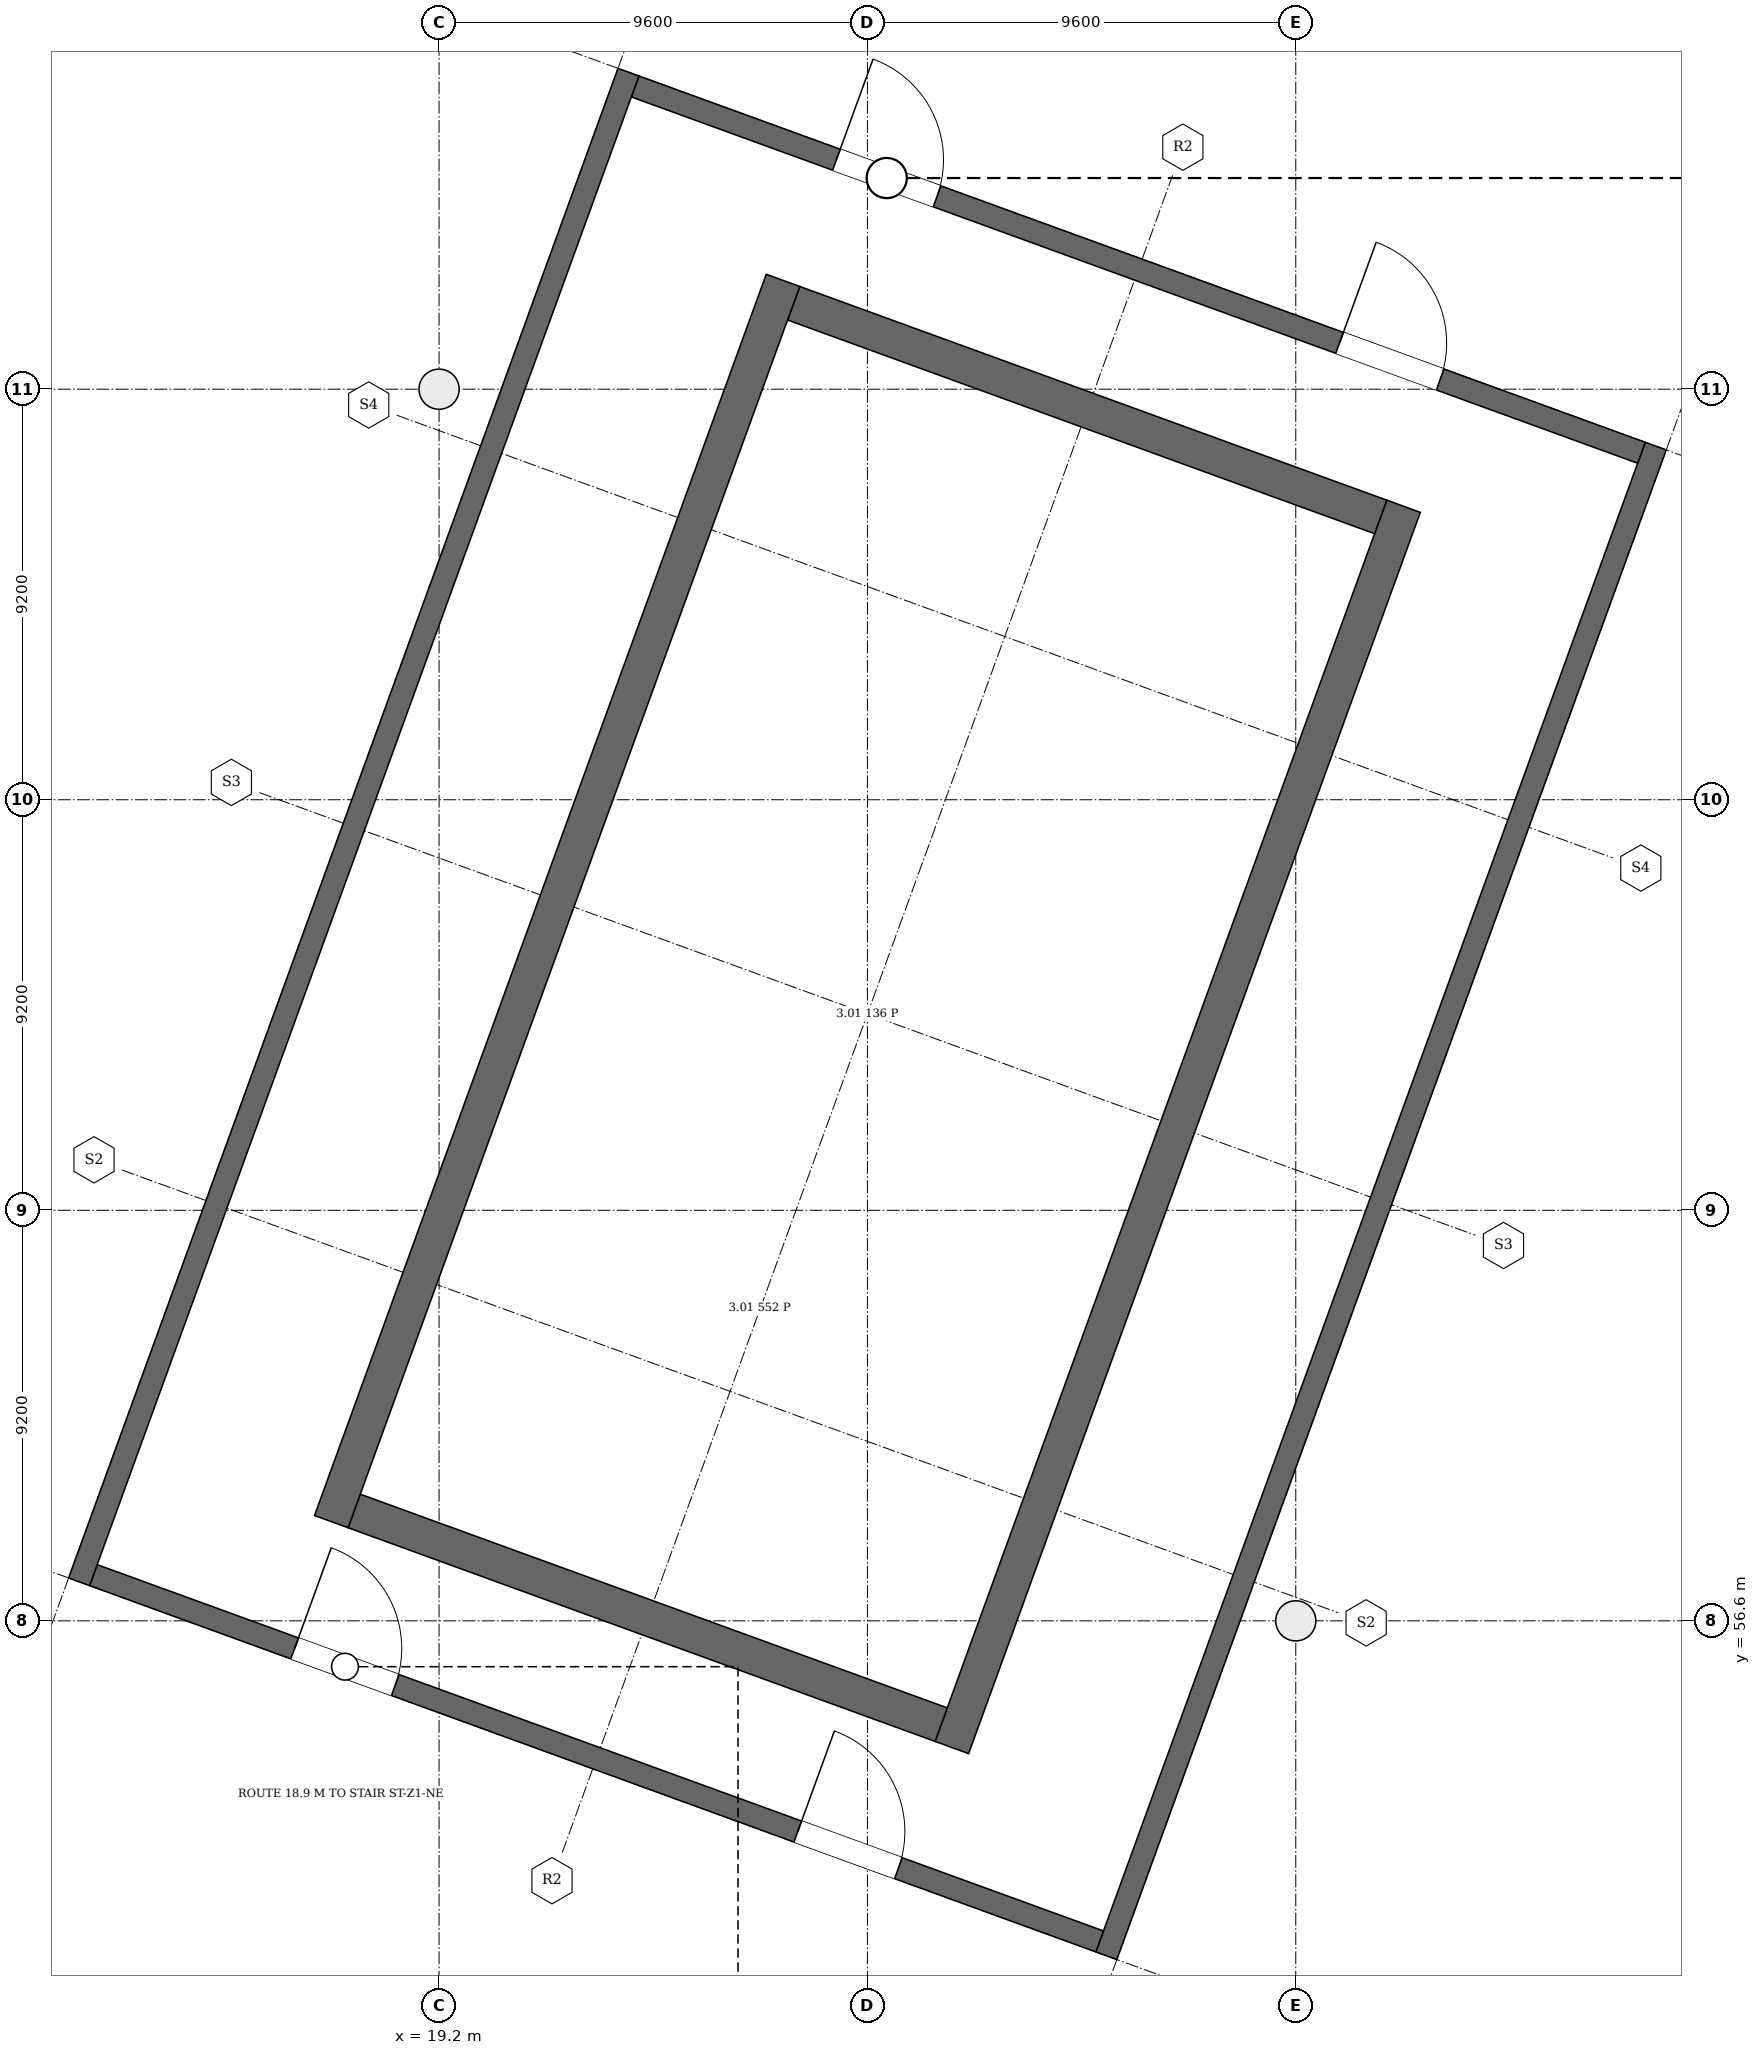
"""IFC4 building model, lengths in metres.
Left out: names, types, materials, properties, quantities, classifications, styles, units other than length and angle.
Written with IfcOpenShell. Run it as: python <this file> out.ifc"""

import sys

from ifc_helpers import new_model, si_unit, direction, frame, frame_2d, origin, origin_2d, place, context, subcontext, project, spatial, rectangle, circle, extrude, element, fill, save


model = new_model("IFC4")
c1 = context("Model", 3, precision=1e-05, world=origin(), true_north=direction((0.0, 1.0)))
c2 = subcontext(c1, "Body", "Model", "MODEL_VIEW")
j1 = project(units=[si_unit("LENGTHUNIT", "METRE"), si_unit("PLANEANGLEUNIT", "RADIAN")], contexts=[c1])
p1 = place(None, origin())
s1 = spatial("IfcSite", under=j1, at=p1, CompositionType="ELEMENT")
p2 = place(p1, origin())
s2 = spatial("IfcBuilding", under=s1, at=p2, CompositionType="ELEMENT")
p3 = place(p2, frame((0.0, 0.0, 21.7)))
s3 = spatial("IfcBuildingStorey", under=s2, at=p3, CompositionType="ELEMENT", Elevation=21.7)
p4 = place(p3, frame((11.132, 57.475, 0.0), z_axis=(0.0, 0.0, 1.0), x_axis=(0.342021295667, 0.939692201367, 0.0)))
e1 = element("IfcWall", 1, at=p4, inside=s3, PredefinedType="SHEAR", context=c2, shape_type="SweptSolid", body=[
    extrude(rectangle(XDim=36.0, YDim=0.5, at=frame_2d((18.0, 0.0))), origin(), (0.0, 0.0, 1.0), 5.0),
])
p5 = place(p3, frame((34.155, 49.096, 0.0), z_axis=(0.0, 0.0, 1.0), x_axis=(0.342019116079, 0.939692994673, 0.0)))
e2 = element("IfcWall", 2, at=p5, inside=s3, PredefinedType="SHEAR", context=c2, shape_type="SweptSolid", body=[
    extrude(rectangle(XDim=36.0, YDim=0.5, at=frame_2d((18.0, 0.0))), origin(), (0.0, 0.0, 1.0), 5.0),
])
p6 = place(p3, frame((11.453, 57.625, 0.0), z_axis=(0.0, 0.0, 1.0), x_axis=(0.939691804709, -0.342022385471, 0.0)))
e3 = element("IfcWall", 3, at=p6, inside=s3, PredefinedType="SHEAR", context=c2, shape_type="SweptSolid", body=[
    extrude(rectangle(XDim=24.0, YDim=0.5, at=frame_2d((12.0, 0.0))), origin(), (0.0, 0.0, 1.0), 5.0),
])
p7 = place(p6, frame((4.8, 0.0, 0.0)))
e4 = element("IfcOpeningElement", 4, at=p7, cuts=e3, PredefinedType="OPENING", context=c2, shape_type="SweptSolid", body=[
    extrude(rectangle(XDim=2.4, YDim=2.4, at=frame_2d((1.2, 1.2))), frame((0.0, 0.26, 0.0), z_axis=(0.0, -1.0, 0.0), x_axis=(1.0, 0.0, 0.0)), (0.0, 0.0, 1.0), 0.52),
])
p8 = place(p6, frame((16.8, 0.0, 0.0)))
e5 = element("IfcOpeningElement", 5, at=p8, cuts=e3, PredefinedType="OPENING", context=c2, shape_type="SweptSolid", body=[
    extrude(rectangle(XDim=2.4, YDim=2.4, at=frame_2d((1.2, 1.2))), frame((0.0, 0.26, 0.0), z_axis=(0.0, -1.0, 0.0), x_axis=(1.0, 0.0, 0.0)), (0.0, 0.0, 1.0), 0.52),
])
p9 = place(p3, frame((23.594, 90.984, 0.0), z_axis=(0.0, 0.0, 1.0), x_axis=(0.939692994673, -0.342019116079, 0.0)))
e6 = element("IfcWall", 6, at=p9, inside=s3, PredefinedType="SHEAR", context=c2, shape_type="SweptSolid", body=[
    extrude(rectangle(XDim=24.0, YDim=0.5, at=frame_2d((12.0, 0.0))), origin(), (0.0, 0.0, 1.0), 5.0),
])
p10 = place(p9, frame((4.8, 0.0, 0.0)))
e7 = element("IfcOpeningElement", 7, at=p10, cuts=e6, PredefinedType="OPENING", context=c2, shape_type="SweptSolid", body=[
    extrude(rectangle(XDim=2.4, YDim=2.4, at=frame_2d((1.2, 1.2))), frame((0.0, 0.26, 0.0), z_axis=(0.0, -1.0, 0.0), x_axis=(1.0, 0.0, 0.0)), (0.0, 0.0, 1.0), 0.52),
])
p11 = place(p9, frame((16.8, 0.0, 0.0)))
e8 = element("IfcOpeningElement", 8, at=p11, cuts=e6, PredefinedType="OPENING", context=c2, shape_type="SweptSolid", body=[
    extrude(rectangle(XDim=2.4, YDim=2.4, at=frame_2d((1.2, 1.2))), frame((0.0, 0.26, 0.0), z_axis=(0.0, -1.0, 0.0), x_axis=(1.0, 0.0, 0.0)), (0.0, 0.0, 1.0), 0.52),
])
p12 = place(p3, frame((16.784, 58.823, 0.0), z_axis=(0.0, 0.0, 1.0), x_axis=(0.342019205328, 0.939692962188, 0.0)))
e9 = element("IfcWall", 9, at=p12, inside=s3, PredefinedType="SOLIDWALL", context=c2, shape_type="SweptSolid", body=[
    extrude(rectangle(XDim=29.6, YDim=0.8, at=frame_2d((14.8, 0.0))), origin(), (0.0, 0.0, 1.0), 5.0),
])
p13 = place(p3, frame((30.692, 53.762, 0.0), z_axis=(0.0, 0.0, 1.0), x_axis=(0.342021856193, 0.939691997352, 0.0)))
e10 = element("IfcWall", 10, at=p13, inside=s3, PredefinedType="SOLIDWALL", context=c2, shape_type="SweptSolid", body=[
    extrude(rectangle(XDim=29.6, YDim=0.8, at=frame_2d((14.8, 0.0))), origin(), (0.0, 0.0, 1.0), 5.0),
])
p14 = place(p3, frame((17.297, 59.062, 0.0), z_axis=(0.0, 0.0, 1.0), x_axis=(0.939690020578, -0.342027287253, 0.0)))
e11 = element("IfcWall", 11, at=p14, inside=s3, PredefinedType="SOLIDWALL", context=c2, shape_type="SweptSolid", body=[
    extrude(rectangle(XDim=14.0, YDim=0.8, at=frame_2d((7.0, 0.0))), origin(), (0.0, 0.0, 1.0), 5.0),
])
p15 = place(p3, frame((27.147, 86.126, 0.0), z_axis=(0.0, 0.0, 1.0), x_axis=(0.939692060566, -0.342021682513, 0.0)))
e12 = element("IfcWall", 12, at=p15, inside=s3, PredefinedType="SOLIDWALL", context=c2, shape_type="SweptSolid", body=[
    extrude(rectangle(XDim=14.0, YDim=0.8, at=frame_2d((7.0, 0.0))), origin(), (0.0, 0.0, 1.0), 5.0),
])
for number, where, z_axis, x_axis in (
    (13, (38.4, 56.6, 0.0), (0.0, 0.0, 1.0), (1.0, 0.0, 0.0)),
    (14, (19.2, 84.2, 0.0), (0.0, 0.0, 1.0), (1.0, 0.0, 0.0)),
):
    element("IfcColumn", number, at=place(p3, frame(where, z_axis=z_axis, x_axis=x_axis)), inside=s3, PredefinedType="COLUMN", context=c2, shape_type="SweptSolid", body=[
        extrude(circle(Radius=0.45, at=origin_2d()), origin(), (0.0, 0.0, 1.0), 5.0),
    ])
p16 = place(p7, origin())
e15 = element("IfcDoor", 15, at=p16, inside=s3, OperationType="DOUBLE_DOOR_SINGLE_SWING", PredefinedType="DOOR", context=c2, shape_type="SweptSolid", body=[
    extrude(rectangle(XDim=2.4, YDim=2.4, at=frame_2d((1.2, 1.2))), frame((0.0, 0.025, 0.0), z_axis=(0.0, -1.0, 0.0), x_axis=(1.0, 0.0, 0.0)), (0.0, 0.0, 1.0), 0.05),
])
fill(e4, e15)
p17 = place(p10, origin())
e16 = element("IfcDoor", 16, at=p17, inside=s3, OperationType="DOUBLE_DOOR_SINGLE_SWING", PredefinedType="DOOR", context=c2, shape_type="SweptSolid", body=[
    extrude(rectangle(XDim=2.4, YDim=2.4, at=frame_2d((1.2, 1.2))), frame((0.0, 0.025, 0.0), z_axis=(0.0, -1.0, 0.0), x_axis=(1.0, 0.0, 0.0)), (0.0, 0.0, 1.0), 0.05),
])
fill(e7, e16)
p18 = place(p8, origin())
e17 = element("IfcDoor", 17, at=p18, inside=s3, OperationType="DOUBLE_DOOR_SINGLE_SWING", PredefinedType="DOOR", context=c2, shape_type="SweptSolid", body=[
    extrude(rectangle(XDim=2.4, YDim=2.4, at=frame_2d((1.2, 1.2))), frame((0.0, 0.025, 0.0), z_axis=(0.0, -1.0, 0.0), x_axis=(1.0, 0.0, 0.0)), (0.0, 0.0, 1.0), 0.05),
])
fill(e5, e17)
p19 = place(p11, origin())
e18 = element("IfcDoor", 18, at=p19, inside=s3, OperationType="DOUBLE_DOOR_SINGLE_SWING", PredefinedType="DOOR", context=c2, shape_type="SweptSolid", body=[
    extrude(rectangle(XDim=2.4, YDim=2.4, at=frame_2d((1.2, 1.2))), frame((0.0, 0.025, 0.0), z_axis=(0.0, -1.0, 0.0), x_axis=(1.0, 0.0, 0.0)), (0.0, 0.0, 1.0), 0.05),
])
fill(e8, e18)
save(model, sys.argv[1])
